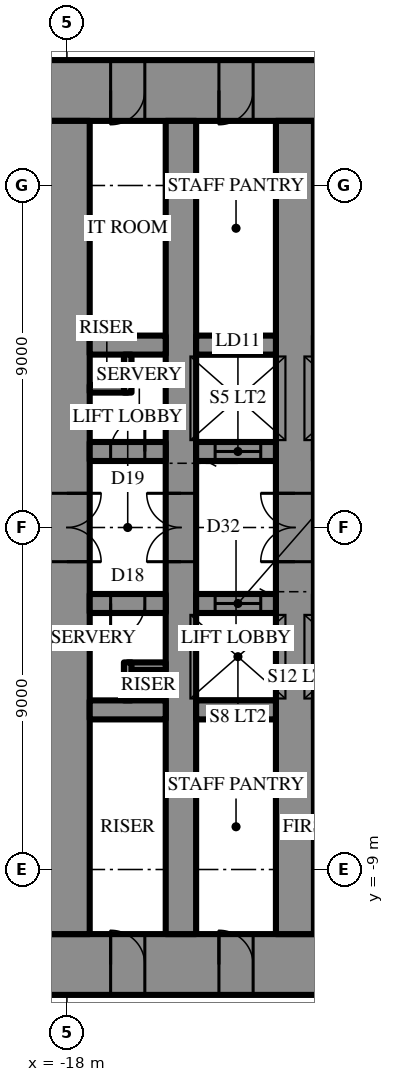
"""IFC4 building model, lengths in metres.
Left out: names, types, materials, properties, quantities, classifications, styles, units other than length and angle.
Written with IfcOpenShell. Run it as: python <this file> out.ifc"""

import sys

from ifc_helpers import new_model, si_unit, direction, frame, frame_2d, origin, place, context, subcontext, project, spatial, rectangle, extrude, element, fill, save


model = new_model("IFC4")
c1 = context("Model", 3, precision=1e-05, world=origin(), true_north=direction((0.0, 1.0)))
c2 = subcontext(c1, "Body", "Model", "MODEL_VIEW")
j1 = project(units=[si_unit("LENGTHUNIT", "METRE"), si_unit("PLANEANGLEUNIT", "RADIAN")], contexts=[c1])
p1 = place(None, origin())
s1 = spatial("IfcSite", under=j1, at=p1, CompositionType="ELEMENT")
p2 = place(p1, origin())
s2 = spatial("IfcBuilding", under=s1, at=p2, CompositionType="ELEMENT")
p3 = place(p2, frame((0.0, 0.0, 210.5)))
s3 = spatial("IfcBuildingStorey", under=s2, at=p3, CompositionType="ELEMENT", Elevation=210.5)
p4 = place(p3, frame((-18.6, 11.5, 0.0), z_axis=(0.0, 0.0, 1.0), x_axis=(1.0, 0.0, 0.0)))
e1 = element("IfcWall", 1, at=p4, inside=s3, PredefinedType="SHEAR", context=c2, shape_type="SweptSolid", body=[
    extrude(rectangle(XDim=37.2, YDim=1.6, at=frame_2d((18.6, 0.0))), origin(), (0.0, 0.0, 1.0), 5.0),
])
p5 = place(p4, frame((19.45, 0.0, 0.0)))
e2 = element("IfcOpeningElement", 2, at=p5, cuts=e1, PredefinedType="OPENING", context=c2, shape_type="SweptSolid", body=[
    extrude(rectangle(XDim=0.9, YDim=2.2, at=frame_2d((0.45, 1.1))), frame((0.0, 0.81, 0.0), z_axis=(0.0, -1.0, 0.0), x_axis=(1.0, 0.0, 0.0)), (0.0, 0.0, 1.0), 1.62),
])
p6 = place(p4, frame((22.45, 0.0, 0.0)))
e3 = element("IfcOpeningElement", 3, at=p6, cuts=e1, PredefinedType="OPENING", context=c2, shape_type="SweptSolid", body=[
    extrude(rectangle(XDim=0.9, YDim=2.2, at=frame_2d((0.45, 1.1))), frame((0.0, 0.81, 0.0), z_axis=(0.0, -1.0, 0.0), x_axis=(1.0, 0.0, 0.0)), (0.0, 0.0, 1.0), 1.62),
])
p7 = place(p4, frame((25.5, 0.0, 0.0)))
e4 = element("IfcOpeningElement", 4, at=p7, cuts=e1, PredefinedType="OPENING", context=c2, shape_type="SweptSolid", body=[
    extrude(rectangle(XDim=1.0, YDim=2.2, at=frame_2d((0.5, 1.1))), frame((0.0, 0.81, 0.0), z_axis=(0.0, -1.0, 0.0), x_axis=(1.0, 0.0, 0.0)), (0.0, 0.0, 1.0), 1.62),
])
p8 = place(p4, frame((1.75, 0.0, 0.0)))
e5 = element("IfcOpeningElement", 5, at=p8, cuts=e1, PredefinedType="OPENING", context=c2, shape_type="SweptSolid", body=[
    extrude(rectangle(XDim=0.9, YDim=2.2, at=frame_2d((0.45, 1.1))), frame((0.0, 0.81, 0.0), z_axis=(0.0, -1.0, 0.0), x_axis=(1.0, 0.0, 0.0)), (0.0, 0.0, 1.0), 1.62),
])
p9 = place(p4, frame((4.6, 0.0, 0.0)))
e6 = element("IfcOpeningElement", 6, at=p9, cuts=e1, PredefinedType="OPENING", context=c2, shape_type="SweptSolid", body=[
    extrude(rectangle(XDim=0.9, YDim=2.2, at=frame_2d((0.45, 1.1))), frame((0.0, 0.81, 0.0), z_axis=(0.0, -1.0, 0.0), x_axis=(1.0, 0.0, 0.0)), (0.0, 0.0, 1.0), 1.62),
])
p10 = place(p4, frame((7.85, 0.0, 0.0)))
e7 = element("IfcOpeningElement", 7, at=p10, cuts=e1, PredefinedType="OPENING", context=c2, shape_type="SweptSolid", body=[
    extrude(rectangle(XDim=0.9, YDim=2.2, at=frame_2d((0.45, 1.1))), frame((0.0, 0.81, 0.0), z_axis=(0.0, -1.0, 0.0), x_axis=(1.0, 0.0, 0.0)), (0.0, 0.0, 1.0), 1.62),
])
p11 = place(p4, frame((28.45, 0.0, 0.0)))
e8 = element("IfcOpeningElement", 8, at=p11, cuts=e1, PredefinedType="OPENING", context=c2, shape_type="SweptSolid", body=[
    extrude(rectangle(XDim=0.9, YDim=2.2, at=frame_2d((0.45, 1.1))), frame((0.0, 0.81, 0.0), z_axis=(0.0, -1.0, 0.0), x_axis=(1.0, 0.0, 0.0)), (0.0, 0.0, 1.0), 1.62),
])
p12 = place(p4, frame((31.7, 0.0, 0.0)))
e9 = element("IfcOpeningElement", 9, at=p12, cuts=e1, PredefinedType="OPENING", context=c2, shape_type="SweptSolid", body=[
    extrude(rectangle(XDim=0.9, YDim=2.2, at=frame_2d((0.45, 1.1))), frame((0.0, 0.81, 0.0), z_axis=(0.0, -1.0, 0.0), x_axis=(1.0, 0.0, 0.0)), (0.0, 0.0, 1.0), 1.62),
])
p13 = place(p4, frame((34.55, 0.0, 0.0)))
e10 = element("IfcOpeningElement", 10, at=p13, cuts=e1, PredefinedType="OPENING", context=c2, shape_type="SweptSolid", body=[
    extrude(rectangle(XDim=0.9, YDim=2.2, at=frame_2d((0.45, 1.1))), frame((0.0, 0.81, 0.0), z_axis=(0.0, -1.0, 0.0), x_axis=(1.0, 0.0, 0.0)), (0.0, 0.0, 1.0), 1.62),
])
p14 = place(p3, frame((18.6, -11.5, 0.0), z_axis=(0.0, 0.0, 1.0), x_axis=(-1.0, 0.0, 0.0)))
e11 = element("IfcWall", 11, at=p14, inside=s3, PredefinedType="SHEAR", context=c2, shape_type="SweptSolid", body=[
    extrude(rectangle(XDim=37.2, YDim=1.6, at=frame_2d((18.6, 0.0))), origin(), (0.0, 0.0, 1.0), 5.0),
])
p15 = place(p14, frame((19.45, 0.0, 0.0)))
e12 = element("IfcOpeningElement", 12, at=p15, cuts=e11, PredefinedType="OPENING", context=c2, shape_type="SweptSolid", body=[
    extrude(rectangle(XDim=0.9, YDim=2.2, at=frame_2d((0.45, 1.1))), frame((0.0, 0.81, 0.0), z_axis=(0.0, -1.0, 0.0), x_axis=(1.0, 0.0, 0.0)), (0.0, 0.0, 1.0), 1.62),
])
p16 = place(p14, frame((22.45, 0.0, 0.0)))
e13 = element("IfcOpeningElement", 13, at=p16, cuts=e11, PredefinedType="OPENING", context=c2, shape_type="SweptSolid", body=[
    extrude(rectangle(XDim=0.9, YDim=2.2, at=frame_2d((0.45, 1.1))), frame((0.0, 0.81, 0.0), z_axis=(0.0, -1.0, 0.0), x_axis=(1.0, 0.0, 0.0)), (0.0, 0.0, 1.0), 1.62),
])
p17 = place(p14, frame((25.5, 0.0, 0.0)))
e14 = element("IfcOpeningElement", 14, at=p17, cuts=e11, PredefinedType="OPENING", context=c2, shape_type="SweptSolid", body=[
    extrude(rectangle(XDim=1.0, YDim=2.2, at=frame_2d((0.5, 1.1))), frame((0.0, 0.81, 0.0), z_axis=(0.0, -1.0, 0.0), x_axis=(1.0, 0.0, 0.0)), (0.0, 0.0, 1.0), 1.62),
])
p18 = place(p14, frame((1.75, 0.0, 0.0)))
e15 = element("IfcOpeningElement", 15, at=p18, cuts=e11, PredefinedType="OPENING", context=c2, shape_type="SweptSolid", body=[
    extrude(rectangle(XDim=0.9, YDim=2.2, at=frame_2d((0.45, 1.1))), frame((0.0, 0.81, 0.0), z_axis=(0.0, -1.0, 0.0), x_axis=(1.0, 0.0, 0.0)), (0.0, 0.0, 1.0), 1.62),
])
p19 = place(p14, frame((4.6, 0.0, 0.0)))
e16 = element("IfcOpeningElement", 16, at=p19, cuts=e11, PredefinedType="OPENING", context=c2, shape_type="SweptSolid", body=[
    extrude(rectangle(XDim=0.9, YDim=2.2, at=frame_2d((0.45, 1.1))), frame((0.0, 0.81, 0.0), z_axis=(0.0, -1.0, 0.0), x_axis=(1.0, 0.0, 0.0)), (0.0, 0.0, 1.0), 1.62),
])
p20 = place(p14, frame((7.85, 0.0, 0.0)))
e17 = element("IfcOpeningElement", 17, at=p20, cuts=e11, PredefinedType="OPENING", context=c2, shape_type="SweptSolid", body=[
    extrude(rectangle(XDim=0.9, YDim=2.2, at=frame_2d((0.45, 1.1))), frame((0.0, 0.81, 0.0), z_axis=(0.0, -1.0, 0.0), x_axis=(1.0, 0.0, 0.0)), (0.0, 0.0, 1.0), 1.62),
])
p21 = place(p14, frame((28.45, 0.0, 0.0)))
e18 = element("IfcOpeningElement", 18, at=p21, cuts=e11, PredefinedType="OPENING", context=c2, shape_type="SweptSolid", body=[
    extrude(rectangle(XDim=0.9, YDim=2.2, at=frame_2d((0.45, 1.1))), frame((0.0, 0.81, 0.0), z_axis=(0.0, -1.0, 0.0), x_axis=(1.0, 0.0, 0.0)), (0.0, 0.0, 1.0), 1.62),
])
p22 = place(p14, frame((31.7, 0.0, 0.0)))
e19 = element("IfcOpeningElement", 19, at=p22, cuts=e11, PredefinedType="OPENING", context=c2, shape_type="SweptSolid", body=[
    extrude(rectangle(XDim=0.9, YDim=2.2, at=frame_2d((0.45, 1.1))), frame((0.0, 0.81, 0.0), z_axis=(0.0, -1.0, 0.0), x_axis=(1.0, 0.0, 0.0)), (0.0, 0.0, 1.0), 1.62),
])
p23 = place(p14, frame((34.55, 0.0, 0.0)))
e20 = element("IfcOpeningElement", 20, at=p23, cuts=e11, PredefinedType="OPENING", context=c2, shape_type="SweptSolid", body=[
    extrude(rectangle(XDim=0.9, YDim=2.2, at=frame_2d((0.45, 1.1))), frame((0.0, 0.81, 0.0), z_axis=(0.0, -1.0, 0.0), x_axis=(1.0, 0.0, 0.0)), (0.0, 0.0, 1.0), 1.62),
])
p24 = place(p3, frame((-18.0, 10.7, 0.0), z_axis=(0.0, 0.0, 1.0), x_axis=(0.0, -1.0, 0.0)))
e21 = element("IfcWall", 21, at=p24, inside=s3, PredefinedType="SHEAR", context=c2, shape_type="SweptSolid", body=[
    extrude(rectangle(XDim=21.4, YDim=1.2, at=frame_2d((10.7, 0.0))), origin(), (0.0, 0.0, 1.0), 5.0),
])
p25 = place(p24, frame((9.8, 0.0, 0.0)))
e22 = element("IfcOpeningElement", 22, at=p25, cuts=e21, PredefinedType="OPENING", context=c2, shape_type="SweptSolid", body=[
    extrude(rectangle(XDim=1.8, YDim=2.4, at=frame_2d((0.9, 1.2))), frame((0.0, 0.61, 0.0), z_axis=(0.0, -1.0, 0.0), x_axis=(1.0, 0.0, 0.0)), (0.0, 0.0, 1.0), 1.22),
])
p26 = place(p3, frame((-12.0, -10.7, 0.0), z_axis=(0.0, 0.0, 1.0), x_axis=(0.0, 1.0, 0.0)))
e23 = element("IfcWall", 23, at=p26, inside=s3, PredefinedType="SHEAR", context=c2, shape_type="SweptSolid", body=[
    extrude(rectangle(XDim=21.4, YDim=1.0, at=frame_2d((10.7, 0.0))), origin(), (0.0, 0.0, 1.0), 5.0),
])
p27 = place(p26, frame((9.8, 0.0, 0.0)))
e24 = element("IfcOpeningElement", 24, at=p27, cuts=e23, PredefinedType="OPENING", context=c2, shape_type="SweptSolid", body=[
    extrude(rectangle(XDim=1.8, YDim=2.4, at=frame_2d((0.9, 1.2))), frame((0.0, 0.51, 0.0), z_axis=(0.0, -1.0, 0.0), x_axis=(1.0, 0.0, 0.0)), (0.0, 0.0, 1.0), 1.02),
])
p28 = place(p3, frame((-15.0, -10.7, 0.0), z_axis=(0.0, 0.0, 1.0), x_axis=(0.0, 1.0, 0.0)))
e25 = element("IfcWall", 25, at=p28, inside=s3, PredefinedType="SHEAR", context=c2, shape_type="SweptSolid", body=[
    extrude(rectangle(XDim=21.4, YDim=0.8, at=frame_2d((10.7, 0.0))), origin(), (0.0, 0.0, 1.0), 5.0),
])
p29 = place(p28, frame((9.8, 0.0, 0.0)))
e26 = element("IfcOpeningElement", 26, at=p29, cuts=e25, PredefinedType="OPENING", context=c2, shape_type="SweptSolid", body=[
    extrude(rectangle(XDim=1.8, YDim=2.4, at=frame_2d((0.9, 1.2))), frame((0.0, 0.41, 0.0), z_axis=(0.0, -1.0, 0.0), x_axis=(1.0, 0.0, 0.0)), (0.0, 0.0, 1.0), 0.82),
])
p30 = place(p3, frame((-17.4, 2.0, 0.0), z_axis=(0.0, 0.0, 1.0), x_axis=(1.0, 0.0, 0.0)))
e27 = element("IfcWall", 27, at=p30, inside=s3, PredefinedType="SHEAR", context=c2, shape_type="SweptSolid", body=[
    extrude(rectangle(XDim=2.0, YDim=0.5, at=frame_2d((1.0, 0.0))), origin(), (0.0, 0.0, 1.0), 5.0),
])
p31 = place(p30, frame((0.55, 0.0, 0.0)))
e28 = element("IfcOpeningElement", 28, at=p31, cuts=e27, PredefinedType="OPENING", context=c2, shape_type="SweptSolid", body=[
    extrude(rectangle(XDim=0.9, YDim=2.2, at=frame_2d((0.45, 1.1))), frame((0.0, 0.26, 0.0), z_axis=(0.0, -1.0, 0.0), x_axis=(1.0, 0.0, 0.0)), (0.0, 0.0, 1.0), 0.52),
])
p32 = place(p3, frame((-14.6, 2.0, 0.0), z_axis=(0.0, 0.0, 1.0), x_axis=(1.0, 0.0, 0.0)))
e29 = element("IfcWall", 29, at=p32, inside=s3, PredefinedType="SHEAR", context=c2, shape_type="SweptSolid", body=[
    extrude(rectangle(XDim=2.1, YDim=0.5, at=frame_2d((1.05, 0.0))), origin(), (0.0, 0.0, 1.0), 5.0),
])
p33 = place(p32, frame((0.5, 0.0, 0.0)))
e30 = element("IfcOpeningElement", 30, at=p33, cuts=e29, PredefinedType="OPENING", context=c2, shape_type="SweptSolid", body=[
    extrude(rectangle(XDim=1.2, YDim=2.2, at=frame_2d((0.6, 1.1))), frame((0.0, 0.26, 0.0), z_axis=(0.0, -1.0, 0.0), x_axis=(1.0, 0.0, 0.0)), (0.0, 0.0, 1.0), 0.52),
])
p34 = place(p3, frame((-17.4, 4.8, 0.0), z_axis=(0.0, 0.0, 1.0), x_axis=(1.0, 0.0, 0.0)))
e31 = element("IfcWall", 31, at=p34, inside=s3, PredefinedType="SHEAR", context=c2, shape_type="SweptSolid", body=[
    extrude(rectangle(XDim=2.0, YDim=0.5, at=frame_2d((1.0, 0.0))), origin(), (0.0, 0.0, 1.0), 5.0),
])
p35 = place(p3, frame((-14.6, 4.8, 0.0), z_axis=(0.0, 0.0, 1.0), x_axis=(1.0, 0.0, 0.0)))
e32 = element("IfcWall", 32, at=p35, inside=s3, PredefinedType="SHEAR", context=c2, shape_type="SweptSolid", body=[
    extrude(rectangle(XDim=2.1, YDim=0.5, at=frame_2d((1.05, 0.0))), origin(), (0.0, 0.0, 1.0), 5.0),
])
p36 = place(p3, frame((3.2, -2.0, 0.0), z_axis=(0.0, 0.0, 1.0), x_axis=(-1.0, 0.0, 0.0)))
e33 = element("IfcWall", 33, at=p36, inside=s3, PredefinedType="SHEAR", context=c2, shape_type="SweptSolid", body=[
    extrude(rectangle(XDim=14.7, YDim=0.5, at=frame_2d((7.35, 0.0))), origin(), (0.0, 0.0, 1.0), 5.0),
])
p37 = place(p36, frame((1.15, 0.0, 0.0)))
e34 = element("IfcOpeningElement", 34, at=p37, cuts=e33, PredefinedType="OPENING", context=c2, shape_type="SweptSolid", body=[
    extrude(rectangle(XDim=1.1, YDim=2.2, at=frame_2d((0.55, 1.1))), frame((0.0, 0.26, 0.0), z_axis=(0.0, -1.0, 0.0), x_axis=(1.0, 0.0, 0.0)), (0.0, 0.0, 1.0), 0.52),
])
p38 = place(p36, frame((4.15, 0.0, 0.0)))
e35 = element("IfcOpeningElement", 35, at=p38, cuts=e33, PredefinedType="OPENING", context=c2, shape_type="SweptSolid", body=[
    extrude(rectangle(XDim=1.1, YDim=2.2, at=frame_2d((0.55, 1.1))), frame((0.0, 0.26, 0.0), z_axis=(0.0, -1.0, 0.0), x_axis=(1.0, 0.0, 0.0)), (0.0, 0.0, 1.0), 0.52),
])
p39 = place(p36, frame((7.15, 0.0, 0.0)))
e36 = element("IfcOpeningElement", 36, at=p39, cuts=e33, PredefinedType="OPENING", context=c2, shape_type="SweptSolid", body=[
    extrude(rectangle(XDim=1.1, YDim=2.2, at=frame_2d((0.55, 1.1))), frame((0.0, 0.26, 0.0), z_axis=(0.0, -1.0, 0.0), x_axis=(1.0, 0.0, 0.0)), (0.0, 0.0, 1.0), 0.52),
])
p40 = place(p36, frame((10.15, 0.0, 0.0)))
e37 = element("IfcOpeningElement", 37, at=p40, cuts=e33, PredefinedType="OPENING", context=c2, shape_type="SweptSolid", body=[
    extrude(rectangle(XDim=1.1, YDim=2.2, at=frame_2d((0.55, 1.1))), frame((0.0, 0.26, 0.0), z_axis=(0.0, -1.0, 0.0), x_axis=(1.0, 0.0, 0.0)), (0.0, 0.0, 1.0), 0.52),
])
p41 = place(p3, frame((-12.5, -2.0, 0.0), z_axis=(0.0, 0.0, 1.0), x_axis=(-1.0, 0.0, 0.0)))
e38 = element("IfcWall", 38, at=p41, inside=s3, PredefinedType="SHEAR", context=c2, shape_type="SweptSolid", body=[
    extrude(rectangle(XDim=2.1, YDim=0.5, at=frame_2d((1.05, 0.0))), origin(), (0.0, 0.0, 1.0), 5.0),
])
p42 = place(p41, frame((0.4, 0.0, 0.0)))
e39 = element("IfcOpeningElement", 39, at=p42, cuts=e38, PredefinedType="OPENING", context=c2, shape_type="SweptSolid", body=[
    extrude(rectangle(XDim=1.2, YDim=2.2, at=frame_2d((0.6, 1.1))), frame((0.0, 0.26, 0.0), z_axis=(0.0, -1.0, 0.0), x_axis=(1.0, 0.0, 0.0)), (0.0, 0.0, 1.0), 0.52),
])
p43 = place(p3, frame((-15.4, -2.0, 0.0), z_axis=(0.0, 0.0, 1.0), x_axis=(-1.0, 0.0, 0.0)))
e40 = element("IfcWall", 40, at=p43, inside=s3, PredefinedType="SHEAR", context=c2, shape_type="SweptSolid", body=[
    extrude(rectangle(XDim=2.0, YDim=0.5, at=frame_2d((1.0, 0.0))), origin(), (0.0, 0.0, 1.0), 5.0),
])
p44 = place(p43, frame((0.55, 0.0, 0.0)))
e41 = element("IfcOpeningElement", 41, at=p44, cuts=e40, PredefinedType="OPENING", context=c2, shape_type="SweptSolid", body=[
    extrude(rectangle(XDim=0.9, YDim=2.2, at=frame_2d((0.45, 1.1))), frame((0.0, 0.26, 0.0), z_axis=(0.0, -1.0, 0.0), x_axis=(1.0, 0.0, 0.0)), (0.0, 0.0, 1.0), 0.52),
])
p45 = place(p3, frame((-12.5, -4.8, 0.0), z_axis=(0.0, 0.0, 1.0), x_axis=(-1.0, 0.0, 0.0)))
e42 = element("IfcWall", 42, at=p45, inside=s3, PredefinedType="SHEAR", context=c2, shape_type="SweptSolid", body=[
    extrude(rectangle(XDim=2.1, YDim=0.5, at=frame_2d((1.05, 0.0))), origin(), (0.0, 0.0, 1.0), 5.0),
])
p46 = place(p3, frame((-15.4, -4.8, 0.0), z_axis=(0.0, 0.0, 1.0), x_axis=(-1.0, 0.0, 0.0)))
e43 = element("IfcWall", 43, at=p46, inside=s3, PredefinedType="SHEAR", context=c2, shape_type="SweptSolid", body=[
    extrude(rectangle(XDim=2.0, YDim=0.5, at=frame_2d((1.0, 0.0))), origin(), (0.0, 0.0, 1.0), 5.0),
])
p47 = place(p3, frame((-31.913, -2.425, 0.0), z_axis=(0.0, 0.0, 1.0), x_axis=(0.500001051461, -0.866024796723, 0.0)))
e44 = element("IfcWall", 44, at=p47, inside=s3, PredefinedType="SOLIDWALL", context=c2, shape_type="SweptSolid", body=[
    extrude(rectangle(XDim=27.713, YDim=0.3, at=frame_2d((13.856, 0.0))), origin(), (0.0, 0.0, 1.0), 2.8),
])
p48 = place(p47, frame((1.309, 0.0, 0.6)))
e45 = element("IfcOpeningElement", 45, at=p48, cuts=e44, PredefinedType="OPENING", context=c2, shape_type="SweptSolid", body=[
    extrude(rectangle(XDim=2.0, YDim=1.95, at=frame_2d((1.0, 0.975))), frame((0.0, 0.16, 0.0), z_axis=(0.0, -1.0, 0.0), x_axis=(1.0, 0.0, 0.0)), (0.0, 0.0, 1.0), 0.32),
])
p49 = place(p47, frame((5.928, 0.0, 0.6)))
e46 = element("IfcOpeningElement", 46, at=p49, cuts=e44, PredefinedType="OPENING", context=c2, shape_type="SweptSolid", body=[
    extrude(rectangle(XDim=2.0, YDim=1.95, at=frame_2d((1.0, 0.975))), frame((0.0, 0.16, 0.0), z_axis=(0.0, -1.0, 0.0), x_axis=(1.0, 0.0, 0.0)), (0.0, 0.0, 1.0), 0.32),
])
p50 = place(p47, frame((10.947, 0.0, 0.0)))
e47 = element("IfcOpeningElement", 47, at=p50, cuts=e44, PredefinedType="OPENING", context=c2, shape_type="SweptSolid", body=[
    extrude(rectangle(XDim=1.2, YDim=2.4, at=frame_2d((0.6, 1.2))), frame((0.0, 0.16, 0.0), z_axis=(0.0, -1.0, 0.0), x_axis=(1.0, 0.0, 0.0)), (0.0, 0.0, 1.0), 0.32),
])
p51 = place(p47, frame((15.166, 0.0, 0.6)))
e48 = element("IfcOpeningElement", 48, at=p51, cuts=e44, PredefinedType="OPENING", context=c2, shape_type="SweptSolid", body=[
    extrude(rectangle(XDim=2.0, YDim=1.95, at=frame_2d((1.0, 0.975))), frame((0.0, 0.16, 0.0), z_axis=(0.0, -1.0, 0.0), x_axis=(1.0, 0.0, 0.0)), (0.0, 0.0, 1.0), 0.32),
])
p52 = place(p47, frame((19.785, 0.0, 0.6)))
e49 = element("IfcOpeningElement", 49, at=p52, cuts=e44, PredefinedType="OPENING", context=c2, shape_type="SweptSolid", body=[
    extrude(rectangle(XDim=2.0, YDim=1.95, at=frame_2d((1.0, 0.975))), frame((0.0, 0.16, 0.0), z_axis=(0.0, -1.0, 0.0), x_axis=(1.0, 0.0, 0.0)), (0.0, 0.0, 1.0), 0.32),
])
p53 = place(p47, frame((24.403, 0.0, 0.6)))
e50 = element("IfcOpeningElement", 50, at=p53, cuts=e44, PredefinedType="OPENING", context=c2, shape_type="SweptSolid", body=[
    extrude(rectangle(XDim=2.0, YDim=1.95, at=frame_2d((1.0, 0.975))), frame((0.0, 0.16, 0.0), z_axis=(0.0, -1.0, 0.0), x_axis=(1.0, 0.0, 0.0)), (0.0, 0.0, 1.0), 0.32),
])
for number, where, z_axis, x_axis in (
    (51, (-17.4, 3.65, 0.0), (0.0, 0.0, 1.0), (1.0, 0.0, 0.0)),
    (52, (-16.4, 3.55, 0.0), (0.0, 0.0, 1.0), (0.0, 1.0, 0.0)),
    (53, (-15.4, -3.65, 0.0), (0.0, 0.0, 1.0), (-1.0, 0.0, 0.0)),
    (54, (-16.4, -3.55, 0.0), (0.0, 0.0, 1.0), (0.0, -1.0, 0.0)),
):
    element("IfcWall", number, at=place(p3, frame(where, z_axis=z_axis, x_axis=x_axis)), inside=s3, PredefinedType="PARTITIONING", context=c2, shape_type="SweptSolid", body=[
        extrude(rectangle(XDim=1.0, YDim=0.2, at=frame_2d((0.5, 0.0))), origin(), (0.0, 0.0, 1.0), 4.8),
    ])
p54 = place(p25, origin())
e55 = element("IfcDoor", 55, at=p54, inside=s3, OperationType="DOUBLE_DOOR_SINGLE_SWING", PredefinedType="DOOR", context=c2, shape_type="SweptSolid", body=[
    extrude(rectangle(XDim=1.8, YDim=2.4, at=frame_2d((0.9, 1.2))), frame((0.0, 0.025, 0.0), z_axis=(0.0, -1.0, 0.0), x_axis=(1.0, 0.0, 0.0)), (0.0, 0.0, 1.0), 0.05),
])
fill(e22, e55)
p55 = place(p8, frame((0.9, 0.0, 0.0), z_axis=(0.0, 0.0, 1.0), x_axis=(-1.0, 0.0, 0.0)))
e56 = element("IfcDoor", 56, at=p55, inside=s3, OperationType="SINGLE_SWING_LEFT", PredefinedType="DOOR", context=c2, shape_type="SweptSolid", body=[
    extrude(rectangle(XDim=0.9, YDim=2.2, at=frame_2d((0.45, 1.1))), frame((0.0, 0.025, 0.0), z_axis=(0.0, -1.0, 0.0), x_axis=(1.0, 0.0, 0.0)), (0.0, 0.0, 1.0), 0.05),
])
fill(e5, e56)
p56 = place(p9, frame((0.9, 0.0, 0.0), z_axis=(0.0, 0.0, 1.0), x_axis=(-1.0, 0.0, 0.0)))
e57 = element("IfcDoor", 57, at=p56, inside=s3, OperationType="SINGLE_SWING_LEFT", PredefinedType="DOOR", context=c2, shape_type="SweptSolid", body=[
    extrude(rectangle(XDim=0.9, YDim=2.2, at=frame_2d((0.45, 1.1))), frame((0.0, 0.025, 0.0), z_axis=(0.0, -1.0, 0.0), x_axis=(1.0, 0.0, 0.0)), (0.0, 0.0, 1.0), 0.05),
])
fill(e6, e57)
p57 = place(p22, frame((0.9, 0.0, 0.0), z_axis=(0.0, 0.0, 1.0), x_axis=(-1.0, 0.0, 0.0)))
e58 = element("IfcDoor", 58, at=p57, inside=s3, OperationType="SINGLE_SWING_RIGHT", PredefinedType="DOOR", context=c2, shape_type="SweptSolid", body=[
    extrude(rectangle(XDim=0.9, YDim=2.2, at=frame_2d((0.45, 1.1))), frame((0.0, 0.025, 0.0), z_axis=(0.0, -1.0, 0.0), x_axis=(1.0, 0.0, 0.0)), (0.0, 0.0, 1.0), 0.05),
])
fill(e19, e58)
p58 = place(p23, frame((0.9, 0.0, 0.0), z_axis=(0.0, 0.0, 1.0), x_axis=(-1.0, 0.0, 0.0)))
e59 = element("IfcDoor", 59, at=p58, inside=s3, OperationType="SINGLE_SWING_RIGHT", PredefinedType="DOOR", context=c2, shape_type="SweptSolid", body=[
    extrude(rectangle(XDim=0.9, YDim=2.2, at=frame_2d((0.45, 1.1))), frame((0.0, 0.025, 0.0), z_axis=(0.0, -1.0, 0.0), x_axis=(1.0, 0.0, 0.0)), (0.0, 0.0, 1.0), 0.05),
])
fill(e20, e59)
p59 = place(p31, origin())
e60 = element("IfcDoor", 60, at=p59, inside=s3, OperationType="SINGLE_SWING_LEFT", PredefinedType="DOOR", context=c2, shape_type="SweptSolid", body=[
    extrude(rectangle(XDim=0.9, YDim=2.2, at=frame_2d((0.45, 1.1))), frame((0.0, 0.025, 0.0), z_axis=(0.0, -1.0, 0.0), x_axis=(1.0, 0.0, 0.0)), (0.0, 0.0, 1.0), 0.05),
])
fill(e28, e60)
p60 = place(p44, origin())
e61 = element("IfcDoor", 61, at=p60, inside=s3, OperationType="SINGLE_SWING_LEFT", PredefinedType="DOOR", context=c2, shape_type="SweptSolid", body=[
    extrude(rectangle(XDim=0.9, YDim=2.2, at=frame_2d((0.45, 1.1))), frame((0.0, 0.025, 0.0), z_axis=(0.0, -1.0, 0.0), x_axis=(1.0, 0.0, 0.0)), (0.0, 0.0, 1.0), 0.05),
])
fill(e41, e61)
p61 = place(p27, origin())
e62 = element("IfcDoor", 62, at=p61, inside=s3, OperationType="DOUBLE_DOOR_SINGLE_SWING", PredefinedType="DOOR", context=c2, shape_type="SweptSolid", body=[
    extrude(rectangle(XDim=1.8, YDim=2.4, at=frame_2d((0.9, 1.2))), frame((0.0, 0.025, 0.0), z_axis=(0.0, -1.0, 0.0), x_axis=(1.0, 0.0, 0.0)), (0.0, 0.0, 1.0), 0.05),
])
fill(e24, e62)
p62 = place(p29, origin())
e63 = element("IfcDoor", 63, at=p62, inside=s3, OperationType="DOUBLE_DOOR_SINGLE_SWING", PredefinedType="DOOR", context=c2, shape_type="SweptSolid", body=[
    extrude(rectangle(XDim=1.8, YDim=2.4, at=frame_2d((0.9, 1.2))), frame((0.0, 0.025, 0.0), z_axis=(0.0, -1.0, 0.0), x_axis=(1.0, 0.0, 0.0)), (0.0, 0.0, 1.0), 0.05),
])
fill(e26, e63)
p63 = place(p33, frame((1.2, 0.0, 0.0), z_axis=(0.0, 0.0, 1.0), x_axis=(-1.0, 0.0, 0.0)))
e64 = element("IfcDoor", 64, at=p63, inside=s3, OperationType="SLIDING_TO_LEFT", PredefinedType="DOOR", context=c2, shape_type="SweptSolid", body=[
    extrude(rectangle(XDim=1.2, YDim=2.2, at=frame_2d((0.6, 1.1))), frame((0.0, 0.025, 0.0), z_axis=(0.0, -1.0, 0.0), x_axis=(1.0, 0.0, 0.0)), (0.0, 0.0, 1.0), 0.05),
])
fill(e30, e64)
p64 = place(p42, frame((1.2, 0.0, 0.0), z_axis=(0.0, 0.0, 1.0), x_axis=(-1.0, 0.0, 0.0)))
e65 = element("IfcDoor", 65, at=p64, inside=s3, OperationType="SLIDING_TO_LEFT", PredefinedType="DOOR", context=c2, shape_type="SweptSolid", body=[
    extrude(rectangle(XDim=1.2, YDim=2.2, at=frame_2d((0.6, 1.1))), frame((0.0, 0.025, 0.0), z_axis=(0.0, -1.0, 0.0), x_axis=(1.0, 0.0, 0.0)), (0.0, 0.0, 1.0), 0.05),
])
fill(e39, e65)
save(model, sys.argv[1])
